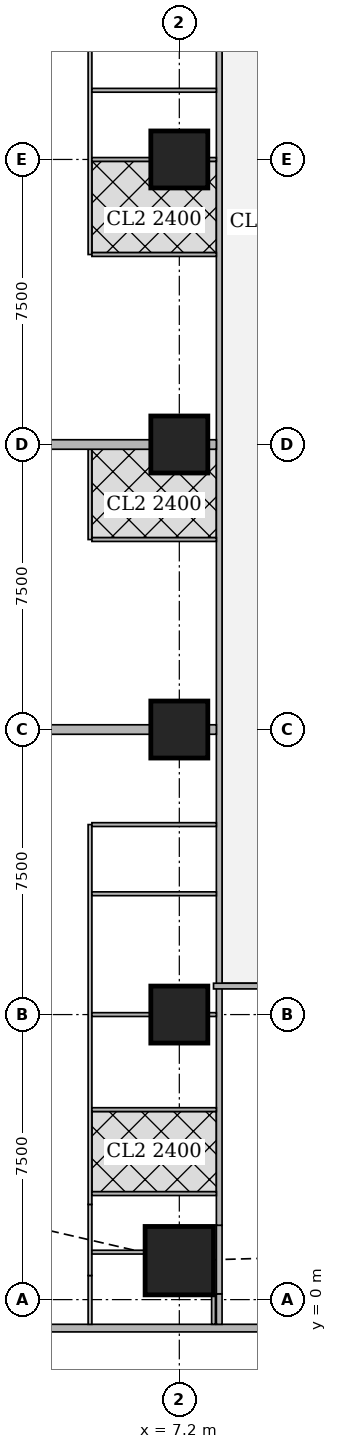
"""IFC4 building model, lengths in metres.
Left out: names, types, materials, properties, quantities, classifications, styles, units other than length and angle.
Written with IfcOpenShell. Run it as: python <this file> out.ifc"""

import sys

from ifc_helpers import new_model, si_unit, direction, frame, frame_2d, origin, origin_2d, place, context, subcontext, project, spatial, rectangle, extrude, element, fill, save


model = new_model("IFC4")
c1 = context("Model", 3, precision=1e-05, world=origin(), true_north=direction((0.0, 1.0)))
c2 = subcontext(c1, "Body", "Model", "MODEL_VIEW")
j1 = project(units=[si_unit("LENGTHUNIT", "METRE"), si_unit("PLANEANGLEUNIT", "RADIAN")], contexts=[c1])
p1 = place(None, origin())
s1 = spatial("IfcSite", under=j1, at=p1, CompositionType="ELEMENT")
p2 = place(p1, origin())
s2 = spatial("IfcBuilding", under=s1, at=p2, CompositionType="ELEMENT")
p3 = place(p2, frame((0.0, 0.0, 169.55)))
s3 = spatial("IfcBuildingStorey", under=s2, at=p3, CompositionType="ELEMENT", Elevation=169.55)
p4 = place(p3, frame((7.2, 1.025, 0.0), z_axis=(0.0, 0.0, 1.0), x_axis=(1.0, 0.0, 0.0)))
e1 = element("IfcColumn", 1, at=p4, inside=s3, PredefinedType="COLUMN", context=c2, shape_type="SweptSolid", body=[
    extrude(rectangle(XDim=1.8, YDim=1.8, at=origin_2d()), origin(), (0.0, 0.0, 1.0), 3.75),
])
for number, where, z_axis, x_axis in (
    (2, (7.2, 7.5, 0.0), (0.0, 0.0, 1.0), (1.0, 0.0, 0.0)),
    (3, (7.2, 15.0, 0.0), (0.0, 0.0, 1.0), (1.0, 0.0, 0.0)),
    (4, (7.2, 22.5, 0.0), (0.0, 0.0, 1.0), (1.0, 0.0, 0.0)),
    (5, (7.2, 30.0, 0.0), (0.0, 0.0, 1.0), (1.0, 0.0, 0.0)),
):
    element("IfcColumn", number, at=place(p3, frame(where, z_axis=z_axis, x_axis=x_axis)), inside=s3, PredefinedType="COLUMN", context=c2, shape_type="SweptSolid", body=[
        extrude(rectangle(XDim=1.5, YDim=1.5, at=origin_2d()), origin(), (0.0, 0.0, 1.0), 3.75),
    ])
p5 = place(p3, frame((2.163, -0.75, 0.0), z_axis=(0.0, 0.0, 1.0), x_axis=(1.0, 0.0, 0.0)))
e6 = element("IfcWall", 6, at=p5, inside=s3, PredefinedType="SOLIDWALL", context=c2, shape_type="SweptSolid", body=[
    extrude(rectangle(XDim=45.628, YDim=0.2, at=frame_2d((22.814, 0.0))), origin(), (0.0, 0.0, 1.0), 3.5),
])
p6 = place(p5, frame((9.537, 0.0, 0.9)))
e7 = element("IfcOpeningElement", 7, at=p6, cuts=e6, PredefinedType="OPENING", context=c2, shape_type="SweptSolid", body=[
    extrude(rectangle(XDim=1.8, YDim=1.5, at=frame_2d((0.9, 0.75))), frame((0.0, 0.11, 0.0), z_axis=(0.0, -1.0, 0.0), x_axis=(1.0, 0.0, 0.0)), (0.0, 0.0, 1.0), 0.22),
])
p7 = place(p5, frame((13.137, 0.0, 0.9)))
e8 = element("IfcOpeningElement", 8, at=p7, cuts=e6, PredefinedType="OPENING", context=c2, shape_type="SweptSolid", body=[
    extrude(rectangle(XDim=1.8, YDim=1.5, at=frame_2d((0.9, 0.75))), frame((0.0, 0.11, 0.0), z_axis=(0.0, -1.0, 0.0), x_axis=(1.0, 0.0, 0.0)), (0.0, 0.0, 1.0), 0.22),
])
p8 = place(p5, frame((16.737, 0.0, 0.9)))
e9 = element("IfcOpeningElement", 9, at=p8, cuts=e6, PredefinedType="OPENING", context=c2, shape_type="SweptSolid", body=[
    extrude(rectangle(XDim=1.8, YDim=1.5, at=frame_2d((0.9, 0.75))), frame((0.0, 0.11, 0.0), z_axis=(0.0, -1.0, 0.0), x_axis=(1.0, 0.0, 0.0)), (0.0, 0.0, 1.0), 0.22),
])
p9 = place(p5, frame((20.337, 0.0, 0.9)))
e10 = element("IfcOpeningElement", 10, at=p9, cuts=e6, PredefinedType="OPENING", context=c2, shape_type="SweptSolid", body=[
    extrude(rectangle(XDim=1.8, YDim=1.5, at=frame_2d((0.9, 0.75))), frame((0.0, 0.11, 0.0), z_axis=(0.0, -1.0, 0.0), x_axis=(1.0, 0.0, 0.0)), (0.0, 0.0, 1.0), 0.22),
])
p10 = place(p5, frame((23.937, 0.0, 0.9)))
e11 = element("IfcOpeningElement", 11, at=p10, cuts=e6, PredefinedType="OPENING", context=c2, shape_type="SweptSolid", body=[
    extrude(rectangle(XDim=1.8, YDim=1.5, at=frame_2d((0.9, 0.75))), frame((0.0, 0.11, 0.0), z_axis=(0.0, -1.0, 0.0), x_axis=(1.0, 0.0, 0.0)), (0.0, 0.0, 1.0), 0.22),
])
p11 = place(p5, frame((27.537, 0.0, 0.9)))
e12 = element("IfcOpeningElement", 12, at=p11, cuts=e6, PredefinedType="OPENING", context=c2, shape_type="SweptSolid", body=[
    extrude(rectangle(XDim=1.8, YDim=1.5, at=frame_2d((0.9, 0.75))), frame((0.0, 0.11, 0.0), z_axis=(0.0, -1.0, 0.0), x_axis=(1.0, 0.0, 0.0)), (0.0, 0.0, 1.0), 0.22),
])
p12 = place(p5, frame((31.137, 0.0, 0.9)))
e13 = element("IfcOpeningElement", 13, at=p12, cuts=e6, PredefinedType="OPENING", context=c2, shape_type="SweptSolid", body=[
    extrude(rectangle(XDim=1.8, YDim=1.5, at=frame_2d((0.9, 0.75))), frame((0.0, 0.11, 0.0), z_axis=(0.0, -1.0, 0.0), x_axis=(1.0, 0.0, 0.0)), (0.0, 0.0, 1.0), 0.22),
])
p13 = place(p5, frame((34.737, 0.0, 0.9)))
e14 = element("IfcOpeningElement", 14, at=p13, cuts=e6, PredefinedType="OPENING", context=c2, shape_type="SweptSolid", body=[
    extrude(rectangle(XDim=1.8, YDim=1.5, at=frame_2d((0.9, 0.75))), frame((0.0, 0.11, 0.0), z_axis=(0.0, -1.0, 0.0), x_axis=(1.0, 0.0, 0.0)), (0.0, 0.0, 1.0), 0.22),
])
p14 = place(p3, frame((8.25, -0.65, 0.0), z_axis=(0.0, 0.0, 1.0), x_axis=(0.0, 1.0, 0.0)))
e15 = element("IfcWall", 15, at=p14, inside=s3, PredefinedType="SOLIDWALL", context=c2, shape_type="SweptSolid", body=[
    extrude(rectangle(XDim=0.802, YDim=0.15, at=frame_2d((0.401, 0.0))), origin(), (0.0, 0.0, 1.0), 3.5),
])
p15 = place(p3, frame((8.25, 0.152, 0.0), z_axis=(0.0, 0.0, 1.0), x_axis=(0.0, 1.0, 0.0)))
e16 = element("IfcWall", 16, at=p15, inside=s3, PredefinedType="SOLIDWALL", context=c2, shape_type="SweptSolid", body=[
    extrude(rectangle(XDim=1.805, YDim=0.15, at=frame_2d((0.902, 0.0))), origin(), (0.0, 0.0, 1.0), 2.1),
])
p16 = place(p3, frame((8.25, 1.957, 0.0), z_axis=(0.0, 0.0, 1.0), x_axis=(0.0, 1.0, 0.0)))
e17 = element("IfcWall", 17, at=p16, inside=s3, PredefinedType="SOLIDWALL", context=c2, shape_type="SweptSolid", body=[
    extrude(rectangle(XDim=41.111, YDim=0.15, at=frame_2d((20.556, 0.0))), origin(), (0.0, 0.0, 1.0), 3.5),
])
p17 = place(p16, frame((10.642, 0.0, 0.0)))
e18 = element("IfcOpeningElement", 18, at=p17, cuts=e17, PredefinedType="OPENING", context=c2, shape_type="SweptSolid", body=[
    extrude(rectangle(XDim=1.0, YDim=2.1, at=frame_2d((0.5, 1.05))), frame((0.0, 0.085, 0.0), z_axis=(0.0, -1.0, 0.0), x_axis=(1.0, 0.0, 0.0)), (0.0, 0.0, 1.0), 0.17),
])
p18 = place(p16, frame((15.042, 0.0, 0.0)))
e19 = element("IfcOpeningElement", 19, at=p18, cuts=e17, PredefinedType="OPENING", context=c2, shape_type="SweptSolid", body=[
    extrude(rectangle(XDim=1.0, YDim=2.1, at=frame_2d((0.5, 1.05))), frame((0.0, 0.085, 0.0), z_axis=(0.0, -1.0, 0.0), x_axis=(1.0, 0.0, 0.0)), (0.0, 0.0, 1.0), 0.17),
])
p19 = place(p16, frame((22.543, 0.0, 0.0)))
e20 = element("IfcOpeningElement", 20, at=p19, cuts=e17, PredefinedType="OPENING", context=c2, shape_type="SweptSolid", body=[
    extrude(rectangle(XDim=1.0, YDim=2.1, at=frame_2d((0.5, 1.05))), frame((0.0, 0.085, 0.0), z_axis=(0.0, -1.0, 0.0), x_axis=(1.0, 0.0, 0.0)), (0.0, 0.0, 1.0), 0.17),
])
p20 = place(p16, frame((33.142, 0.0, 0.0)))
e21 = element("IfcOpeningElement", 21, at=p20, cuts=e17, PredefinedType="OPENING", context=c2, shape_type="SweptSolid", body=[
    extrude(rectangle(XDim=1.0, YDim=2.1, at=frame_2d((0.5, 1.05))), frame((0.0, 0.085, 0.0), z_axis=(0.0, -1.0, 0.0), x_axis=(1.0, 0.0, 0.0)), (0.0, 0.0, 1.0), 0.17),
])
p21 = place(p3, frame((13.649, 8.25, 0.0), z_axis=(0.0, 0.0, 1.0), x_axis=(-1.0, 0.0, 0.0)))
e22 = element("IfcWall", 22, at=p21, inside=s3, PredefinedType="SOLIDWALL", context=c2, shape_type="SweptSolid", body=[
    extrude(rectangle(XDim=5.549, YDim=0.15, at=frame_2d((2.774, 0.0))), origin(), (0.0, 0.0, 1.0), 3.5),
])
p22 = place(p21, frame((1.824, 0.0, 0.0)))
e23 = element("IfcOpeningElement", 23, at=p22, cuts=e22, PredefinedType="OPENING", context=c2, shape_type="SweptSolid", body=[
    extrude(rectangle(XDim=1.0, YDim=2.1, at=frame_2d((0.5, 1.05))), frame((0.0, 0.085, 0.0), z_axis=(0.0, -1.0, 0.0), x_axis=(1.0, 0.0, 0.0)), (0.0, 0.0, 1.0), 0.17),
])
p23 = place(p3, frame((8.1, 0.124, 0.0), z_axis=(0.0, 0.0, 1.0), x_axis=(0.0, -1.0, 0.0)))
e24 = element("IfcWall", 24, at=p23, inside=s3, PredefinedType="PARTITIONING", context=c2, shape_type="SweptSolid", body=[
    extrude(rectangle(XDim=0.774, YDim=0.1, at=frame_2d((0.387, 0.0))), origin(), (0.0, 0.0, 1.0), 3.5),
])
p24 = place(p3, frame((4.85, -0.65, 0.0), z_axis=(0.0, 0.0, 1.0), x_axis=(0.0, 1.0, 0.0)))
e25 = element("IfcWall", 25, at=p24, inside=s3, PredefinedType="PARTITIONING", context=c2, shape_type="SweptSolid", body=[
    extrude(rectangle(XDim=1.284, YDim=0.1, at=frame_2d((0.642, 0.0))), origin(), (0.0, 0.0, 1.0), 3.5),
])
p25 = place(p24, frame((0.234, 0.0, 0.0)))
e26 = element("IfcOpeningElement", 26, at=p25, cuts=e25, PredefinedType="OPENING", context=c2, shape_type="SweptSolid", body=[
    extrude(rectangle(XDim=0.9, YDim=2.1, at=frame_2d((0.45, 1.05))), frame((0.0, 0.06, 0.0), z_axis=(0.0, -1.0, 0.0), x_axis=(1.0, 0.0, 0.0)), (0.0, 0.0, 1.0), 0.12),
])
p26 = place(p3, frame((4.85, 0.634, 0.0), z_axis=(0.0, 0.0, 1.0), x_axis=(0.0, 1.0, 0.0)))
e27 = element("IfcWall", 27, at=p26, inside=s3, PredefinedType="PARTITIONING", context=c2, shape_type="SweptSolid", body=[
    extrude(rectangle(XDim=1.871, YDim=0.1, at=frame_2d((0.936, 0.0))), origin(), (0.0, 0.0, 1.0), 2.1),
])
p27 = place(p3, frame((4.85, 2.505, 0.0), z_axis=(0.0, 0.0, 1.0), x_axis=(0.0, 1.0, 0.0)))
e28 = element("IfcWall", 28, at=p27, inside=s3, PredefinedType="PARTITIONING", context=c2, shape_type="SweptSolid", body=[
    extrude(rectangle(XDim=9.994, YDim=0.1, at=frame_2d((4.997, 0.0))), origin(), (0.0, 0.0, 1.0), 3.5),
])
p28 = place(p27, frame((8.634, 0.0, 0.0)))
e29 = element("IfcOpeningElement", 29, at=p28, cuts=e28, PredefinedType="OPENING", context=c2, shape_type="SweptSolid", body=[
    extrude(rectangle(XDim=0.9, YDim=2.1, at=frame_2d((0.45, 1.05))), frame((0.0, 0.06, 0.0), z_axis=(0.0, -1.0, 0.0), x_axis=(1.0, 0.0, 0.0)), (0.0, 0.0, 1.0), 0.12),
])
p29 = place(p27, frame((3.294, 0.0, 0.0)))
e30 = element("IfcOpeningElement", 30, at=p29, cuts=e28, PredefinedType="OPENING", context=c2, shape_type="SweptSolid", body=[
    extrude(rectangle(XDim=0.9, YDim=2.1, at=frame_2d((0.45, 1.05))), frame((0.0, 0.06, 0.0), z_axis=(0.0, -1.0, 0.0), x_axis=(1.0, 0.0, 0.0)), (0.0, 0.0, 1.0), 0.12),
])
p30 = place(p27, frame((0.939, 0.0, 0.0)))
e31 = element("IfcOpeningElement", 31, at=p30, cuts=e28, PredefinedType="OPENING", context=c2, shape_type="SweptSolid", body=[
    extrude(rectangle(XDim=0.9, YDim=2.1, at=frame_2d((0.45, 1.05))), frame((0.0, 0.06, 0.0), z_axis=(0.0, -1.0, 0.0), x_axis=(1.0, 0.0, 0.0)), (0.0, 0.0, 1.0), 0.12),
])
p31 = place(p27, frame((6.135, 0.0, 0.0)))
e32 = element("IfcOpeningElement", 32, at=p31, cuts=e28, PredefinedType="OPENING", context=c2, shape_type="SweptSolid", body=[
    extrude(rectangle(XDim=0.9, YDim=2.1, at=frame_2d((0.45, 1.05))), frame((0.0, 0.06, 0.0), z_axis=(0.0, -1.0, 0.0), x_axis=(1.0, 0.0, 0.0)), (0.0, 0.0, 1.0), 0.12),
])
p32 = place(p3, frame((4.9, 4.999, 0.0), z_axis=(0.0, 0.0, 1.0), x_axis=(1.0, 0.0, 0.0)))
e33 = element("IfcWall", 33, at=p32, inside=s3, PredefinedType="PARTITIONING", context=c2, shape_type="SweptSolid", body=[
    extrude(rectangle(XDim=3.275, YDim=0.1, at=frame_2d((1.638, 0.0))), origin(), (0.0, 0.0, 1.0), 3.5),
])
p33 = place(p3, frame((4.9, 7.5, 0.0), z_axis=(0.0, 0.0, 1.0), x_axis=(1.0, 0.0, 0.0)))
e34 = element("IfcWall", 34, at=p33, inside=s3, PredefinedType="PARTITIONING", context=c2, shape_type="SweptSolid", body=[
    extrude(rectangle(XDim=1.549, YDim=0.1, at=frame_2d((0.774, 0.0))), origin(), (0.0, 0.0, 1.0), 3.5),
])
p34 = place(p3, frame((7.951, 7.5, 0.0), z_axis=(0.0, 0.0, 1.0), x_axis=(1.0, 0.0, 0.0)))
e35 = element("IfcWall", 35, at=p34, inside=s3, PredefinedType="PARTITIONING", context=c2, shape_type="SweptSolid", body=[
    extrude(rectangle(XDim=0.224, YDim=0.1, at=frame_2d((0.112, 0.0))), origin(), (0.0, 0.0, 1.0), 3.5),
])
p35 = place(p3, frame((4.9, 12.499, 0.0), z_axis=(0.0, 0.0, 1.0), x_axis=(1.0, 0.0, 0.0)))
e36 = element("IfcWall", 36, at=p35, inside=s3, PredefinedType="PARTITIONING", context=c2, shape_type="SweptSolid", body=[
    extrude(rectangle(XDim=3.275, YDim=0.1, at=frame_2d((1.638, 0.0))), origin(), (0.0, 0.0, 1.0), 3.5),
])
p36 = place(p3, frame((4.9, 1.249, 0.0), z_axis=(0.0, 0.0, 1.0), x_axis=(1.0, 0.0, 0.0)))
e37 = element("IfcWall", 37, at=p36, inside=s3, PredefinedType="PARTITIONING", context=c2, shape_type="SweptSolid", body=[
    extrude(rectangle(XDim=1.399, YDim=0.1, at=frame_2d((0.7, 0.0))), origin(), (0.0, 0.0, 1.0), 2.1),
])
p37 = place(p3, frame((4.9, 10.679, 0.0), z_axis=(0.0, 0.0, 1.0), x_axis=(1.0, 0.0, 0.0)))
e38 = element("IfcWall", 38, at=p37, inside=s3, PredefinedType="PARTITIONING", context=c2, shape_type="SweptSolid", body=[
    extrude(rectangle(XDim=3.275, YDim=0.1, at=frame_2d((1.638, 0.0))), origin(), (0.0, 0.0, 1.0), 3.5),
])
p38 = place(p3, frame((4.9, 2.789, 0.0), z_axis=(0.0, 0.0, 1.0), x_axis=(1.0, 0.0, 0.0)))
e39 = element("IfcWall", 39, at=p38, inside=s3, PredefinedType="PARTITIONING", context=c2, shape_type="SweptSolid", body=[
    extrude(rectangle(XDim=3.275, YDim=0.1, at=frame_2d((1.638, 0.0))), origin(), (0.0, 0.0, 1.0), 3.5),
])
p39 = place(p38, frame((0.45, 0.0, 0.0)))
e40 = element("IfcOpeningElement", 40, at=p39, cuts=e39, PredefinedType="OPENING", context=c2, shape_type="SweptSolid", body=[
    extrude(rectangle(XDim=0.9, YDim=2.1, at=frame_2d((0.45, 1.05))), frame((0.0, 0.06, 0.0), z_axis=(0.0, -1.0, 0.0), x_axis=(1.0, 0.0, 0.0)), (0.0, 0.0, 1.0), 0.12),
])
p40 = place(p3, frame((4.85, 19.999, 0.0), z_axis=(0.0, 0.0, 1.0), x_axis=(0.0, 1.0, 0.0)))
e41 = element("IfcWall", 41, at=p40, inside=s3, PredefinedType="PARTITIONING", context=c2, shape_type="SweptSolid", body=[
    extrude(rectangle(XDim=2.376, YDim=0.1, at=frame_2d((1.188, 0.0))), origin(), (0.0, 0.0, 1.0), 3.5),
])
p41 = place(p40, frame((0.8, 0.0, 0.0)))
e42 = element("IfcOpeningElement", 42, at=p41, cuts=e41, PredefinedType="OPENING", context=c2, shape_type="SweptSolid", body=[
    extrude(rectangle(XDim=0.9, YDim=2.1, at=frame_2d((0.45, 1.05))), frame((0.0, 0.06, 0.0), z_axis=(0.0, -1.0, 0.0), x_axis=(1.0, 0.0, 0.0)), (0.0, 0.0, 1.0), 0.12),
])
p42 = place(p3, frame((4.9, 19.999, 0.0), z_axis=(0.0, 0.0, 1.0), x_axis=(1.0, 0.0, 0.0)))
e43 = element("IfcWall", 43, at=p42, inside=s3, PredefinedType="PARTITIONING", context=c2, shape_type="SweptSolid", body=[
    extrude(rectangle(XDim=3.275, YDim=0.1, at=frame_2d((1.638, 0.0))), origin(), (0.0, 0.0, 1.0), 3.5),
])
p43 = place(p3, frame((3.65, 15.0, 0.0), z_axis=(0.0, 0.0, 1.0), x_axis=(1.0, 0.0, 0.0)))
e44 = element("IfcWall", 44, at=p43, inside=s3, PredefinedType="SOLIDWALL", context=c2, shape_type="SweptSolid", body=[
    extrude(rectangle(XDim=2.799, YDim=0.25, at=frame_2d((1.399, 0.0))), origin(), (0.0, 0.0, 1.0), 3.5),
])
p44 = place(p3, frame((7.951, 15.0, 0.0), z_axis=(0.0, 0.0, 1.0), x_axis=(1.0, 0.0, 0.0)))
e45 = element("IfcWall", 45, at=p44, inside=s3, PredefinedType="SOLIDWALL", context=c2, shape_type="SweptSolid", body=[
    extrude(rectangle(XDim=0.224, YDim=0.25, at=frame_2d((0.112, 0.0))), origin(), (0.0, 0.0, 1.0), 3.5),
])
p45 = place(p3, frame((4.85, 27.499, 0.0), z_axis=(0.0, 0.0, 1.0), x_axis=(0.0, 1.0, 0.0)))
e46 = element("IfcWall", 46, at=p45, inside=s3, PredefinedType="PARTITIONING", context=c2, shape_type="SweptSolid", body=[
    extrude(rectangle(XDim=7.375, YDim=0.1, at=frame_2d((3.688, 0.0))), origin(), (0.0, 0.0, 1.0), 3.5),
])
p46 = place(p45, frame((0.8, 0.0, 0.0)))
e47 = element("IfcOpeningElement", 47, at=p46, cuts=e46, PredefinedType="OPENING", context=c2, shape_type="SweptSolid", body=[
    extrude(rectangle(XDim=0.9, YDim=2.1, at=frame_2d((0.45, 1.05))), frame((0.0, 0.06, 0.0), z_axis=(0.0, -1.0, 0.0), x_axis=(1.0, 0.0, 0.0)), (0.0, 0.0, 1.0), 0.12),
])
p47 = place(p45, frame((2.961, 0.0, 0.0)))
e48 = element("IfcOpeningElement", 48, at=p47, cuts=e46, PredefinedType="OPENING", context=c2, shape_type="SweptSolid", body=[
    extrude(rectangle(XDim=0.9, YDim=2.1, at=frame_2d((0.45, 1.05))), frame((0.0, 0.06, 0.0), z_axis=(0.0, -1.0, 0.0), x_axis=(1.0, 0.0, 0.0)), (0.0, 0.0, 1.0), 0.12),
])
p48 = place(p45, frame((5.461, 0.0, 0.0)))
e49 = element("IfcOpeningElement", 49, at=p48, cuts=e46, PredefinedType="OPENING", context=c2, shape_type="SweptSolid", body=[
    extrude(rectangle(XDim=0.9, YDim=2.1, at=frame_2d((0.45, 1.05))), frame((0.0, 0.06, 0.0), z_axis=(0.0, -1.0, 0.0), x_axis=(1.0, 0.0, 0.0)), (0.0, 0.0, 1.0), 0.12),
])
p49 = place(p3, frame((4.9, 27.499, 0.0), z_axis=(0.0, 0.0, 1.0), x_axis=(1.0, 0.0, 0.0)))
e50 = element("IfcWall", 50, at=p49, inside=s3, PredefinedType="PARTITIONING", context=c2, shape_type="SweptSolid", body=[
    extrude(rectangle(XDim=3.275, YDim=0.1, at=frame_2d((1.638, 0.0))), origin(), (0.0, 0.0, 1.0), 3.5),
])
p50 = place(p3, frame((4.9, 30.0, 0.0), z_axis=(0.0, 0.0, 1.0), x_axis=(1.0, 0.0, 0.0)))
e51 = element("IfcWall", 51, at=p50, inside=s3, PredefinedType="PARTITIONING", context=c2, shape_type="SweptSolid", body=[
    extrude(rectangle(XDim=1.549, YDim=0.1, at=frame_2d((0.774, 0.0))), origin(), (0.0, 0.0, 1.0), 3.5),
])
p51 = place(p3, frame((7.951, 30.0, 0.0), z_axis=(0.0, 0.0, 1.0), x_axis=(1.0, 0.0, 0.0)))
e52 = element("IfcWall", 52, at=p51, inside=s3, PredefinedType="PARTITIONING", context=c2, shape_type="SweptSolid", body=[
    extrude(rectangle(XDim=0.224, YDim=0.1, at=frame_2d((0.112, 0.0))), origin(), (0.0, 0.0, 1.0), 3.5),
])
p52 = place(p3, frame((4.9, 31.82, 0.0), z_axis=(0.0, 0.0, 1.0), x_axis=(1.0, 0.0, 0.0)))
e53 = element("IfcWall", 53, at=p52, inside=s3, PredefinedType="PARTITIONING", context=c2, shape_type="SweptSolid", body=[
    extrude(rectangle(XDim=3.275, YDim=0.1, at=frame_2d((1.638, 0.0))), origin(), (0.0, 0.0, 1.0), 3.5),
])
p53 = place(p3, frame((3.65, 22.5, 0.0), z_axis=(0.0, 0.0, 1.0), x_axis=(1.0, 0.0, 0.0)))
e54 = element("IfcWall", 54, at=p53, inside=s3, PredefinedType="SOLIDWALL", context=c2, shape_type="SweptSolid", body=[
    extrude(rectangle(XDim=2.799, YDim=0.25, at=frame_2d((1.399, 0.0))), origin(), (0.0, 0.0, 1.0), 3.5),
])
p54 = place(p3, frame((7.951, 22.5, 0.0), z_axis=(0.0, 0.0, 1.0), x_axis=(1.0, 0.0, 0.0)))
e55 = element("IfcWall", 55, at=p54, inside=s3, PredefinedType="SOLIDWALL", context=c2, shape_type="SweptSolid", body=[
    extrude(rectangle(XDim=0.224, YDim=0.25, at=frame_2d((0.112, 0.0))), origin(), (0.0, 0.0, 1.0), 3.5),
])
p55 = place(p28, origin())
e56 = element("IfcDoor", 56, at=p55, inside=s3, OperationType="SINGLE_SWING_LEFT", PredefinedType="DOOR", context=c2, shape_type="SweptSolid", body=[
    extrude(rectangle(XDim=0.9, YDim=2.1, at=frame_2d((0.45, 1.05))), frame((0.0, 0.025, 0.0), z_axis=(0.0, -1.0, 0.0), x_axis=(1.0, 0.0, 0.0)), (0.0, 0.0, 1.0), 0.05),
])
fill(e29, e56)
p56 = place(p29, origin())
e57 = element("IfcDoor", 57, at=p56, inside=s3, OperationType="SINGLE_SWING_RIGHT", PredefinedType="DOOR", context=c2, shape_type="SweptSolid", body=[
    extrude(rectangle(XDim=0.9, YDim=2.1, at=frame_2d((0.45, 1.05))), frame((0.0, 0.025, 0.0), z_axis=(0.0, -1.0, 0.0), x_axis=(1.0, 0.0, 0.0)), (0.0, 0.0, 1.0), 0.05),
])
fill(e30, e57)
p57 = place(p30, origin())
e58 = element("IfcDoor", 58, at=p57, inside=s3, OperationType="SINGLE_SWING_RIGHT", PredefinedType="DOOR", context=c2, shape_type="SweptSolid", body=[
    extrude(rectangle(XDim=0.9, YDim=2.1, at=frame_2d((0.45, 1.05))), frame((0.0, 0.025, 0.0), z_axis=(0.0, -1.0, 0.0), x_axis=(1.0, 0.0, 0.0)), (0.0, 0.0, 1.0), 0.05),
])
fill(e31, e58)
p58 = place(p25, origin())
e59 = element("IfcDoor", 59, at=p58, inside=s3, OperationType="SINGLE_SWING_LEFT", PredefinedType="DOOR", context=c2, shape_type="SweptSolid", body=[
    extrude(rectangle(XDim=0.9, YDim=2.1, at=frame_2d((0.45, 1.05))), frame((0.0, 0.025, 0.0), z_axis=(0.0, -1.0, 0.0), x_axis=(1.0, 0.0, 0.0)), (0.0, 0.0, 1.0), 0.05),
])
fill(e26, e59)
p59 = place(p31, origin())
e60 = element("IfcDoor", 60, at=p59, inside=s3, OperationType="SINGLE_SWING_LEFT", PredefinedType="DOOR", context=c2, shape_type="SweptSolid", body=[
    extrude(rectangle(XDim=0.9, YDim=2.1, at=frame_2d((0.45, 1.05))), frame((0.0, 0.025, 0.0), z_axis=(0.0, -1.0, 0.0), x_axis=(1.0, 0.0, 0.0)), (0.0, 0.0, 1.0), 0.05),
])
fill(e32, e60)
p60 = place(p39, origin())
e61 = element("IfcDoor", 61, at=p60, inside=s3, OperationType="SINGLE_SWING_RIGHT", PredefinedType="DOOR", context=c2, shape_type="SweptSolid", body=[
    extrude(rectangle(XDim=0.9, YDim=2.1, at=frame_2d((0.45, 1.05))), frame((0.0, 0.025, 0.0), z_axis=(0.0, -1.0, 0.0), x_axis=(1.0, 0.0, 0.0)), (0.0, 0.0, 1.0), 0.05),
])
fill(e40, e61)
p61 = place(p17, origin())
e62 = element("IfcDoor", 62, at=p61, inside=s3, OperationType="SINGLE_SWING_LEFT", PredefinedType="DOOR", context=c2, shape_type="SweptSolid", body=[
    extrude(rectangle(XDim=1.0, YDim=2.1, at=frame_2d((0.5, 1.05))), frame((0.0, 0.025, 0.0), z_axis=(0.0, -1.0, 0.0), x_axis=(1.0, 0.0, 0.0)), (0.0, 0.0, 1.0), 0.05),
])
fill(e18, e62)
p62 = place(p41, origin())
e63 = element("IfcDoor", 63, at=p62, inside=s3, OperationType="SINGLE_SWING_LEFT", PredefinedType="DOOR", context=c2, shape_type="SweptSolid", body=[
    extrude(rectangle(XDim=0.9, YDim=2.1, at=frame_2d((0.45, 1.05))), frame((0.0, 0.025, 0.0), z_axis=(0.0, -1.0, 0.0), x_axis=(1.0, 0.0, 0.0)), (0.0, 0.0, 1.0), 0.05),
])
fill(e42, e63)
p63 = place(p18, origin())
e64 = element("IfcDoor", 64, at=p63, inside=s3, OperationType="SINGLE_SWING_LEFT", PredefinedType="DOOR", context=c2, shape_type="SweptSolid", body=[
    extrude(rectangle(XDim=1.0, YDim=2.1, at=frame_2d((0.5, 1.05))), frame((0.0, 0.025, 0.0), z_axis=(0.0, -1.0, 0.0), x_axis=(1.0, 0.0, 0.0)), (0.0, 0.0, 1.0), 0.05),
])
fill(e19, e64)
p64 = place(p46, origin())
e65 = element("IfcDoor", 65, at=p64, inside=s3, OperationType="SINGLE_SWING_RIGHT", PredefinedType="DOOR", context=c2, shape_type="SweptSolid", body=[
    extrude(rectangle(XDim=0.9, YDim=2.1, at=frame_2d((0.45, 1.05))), frame((0.0, 0.025, 0.0), z_axis=(0.0, -1.0, 0.0), x_axis=(1.0, 0.0, 0.0)), (0.0, 0.0, 1.0), 0.05),
])
fill(e47, e65)
p65 = place(p47, origin())
e66 = element("IfcDoor", 66, at=p65, inside=s3, OperationType="SINGLE_SWING_LEFT", PredefinedType="DOOR", context=c2, shape_type="SweptSolid", body=[
    extrude(rectangle(XDim=0.9, YDim=2.1, at=frame_2d((0.45, 1.05))), frame((0.0, 0.025, 0.0), z_axis=(0.0, -1.0, 0.0), x_axis=(1.0, 0.0, 0.0)), (0.0, 0.0, 1.0), 0.05),
])
fill(e48, e66)
p66 = place(p19, origin())
e67 = element("IfcDoor", 67, at=p66, inside=s3, OperationType="SINGLE_SWING_LEFT", PredefinedType="DOOR", context=c2, shape_type="SweptSolid", body=[
    extrude(rectangle(XDim=1.0, YDim=2.1, at=frame_2d((0.5, 1.05))), frame((0.0, 0.025, 0.0), z_axis=(0.0, -1.0, 0.0), x_axis=(1.0, 0.0, 0.0)), (0.0, 0.0, 1.0), 0.05),
])
fill(e20, e67)
save(model, sys.argv[1])
